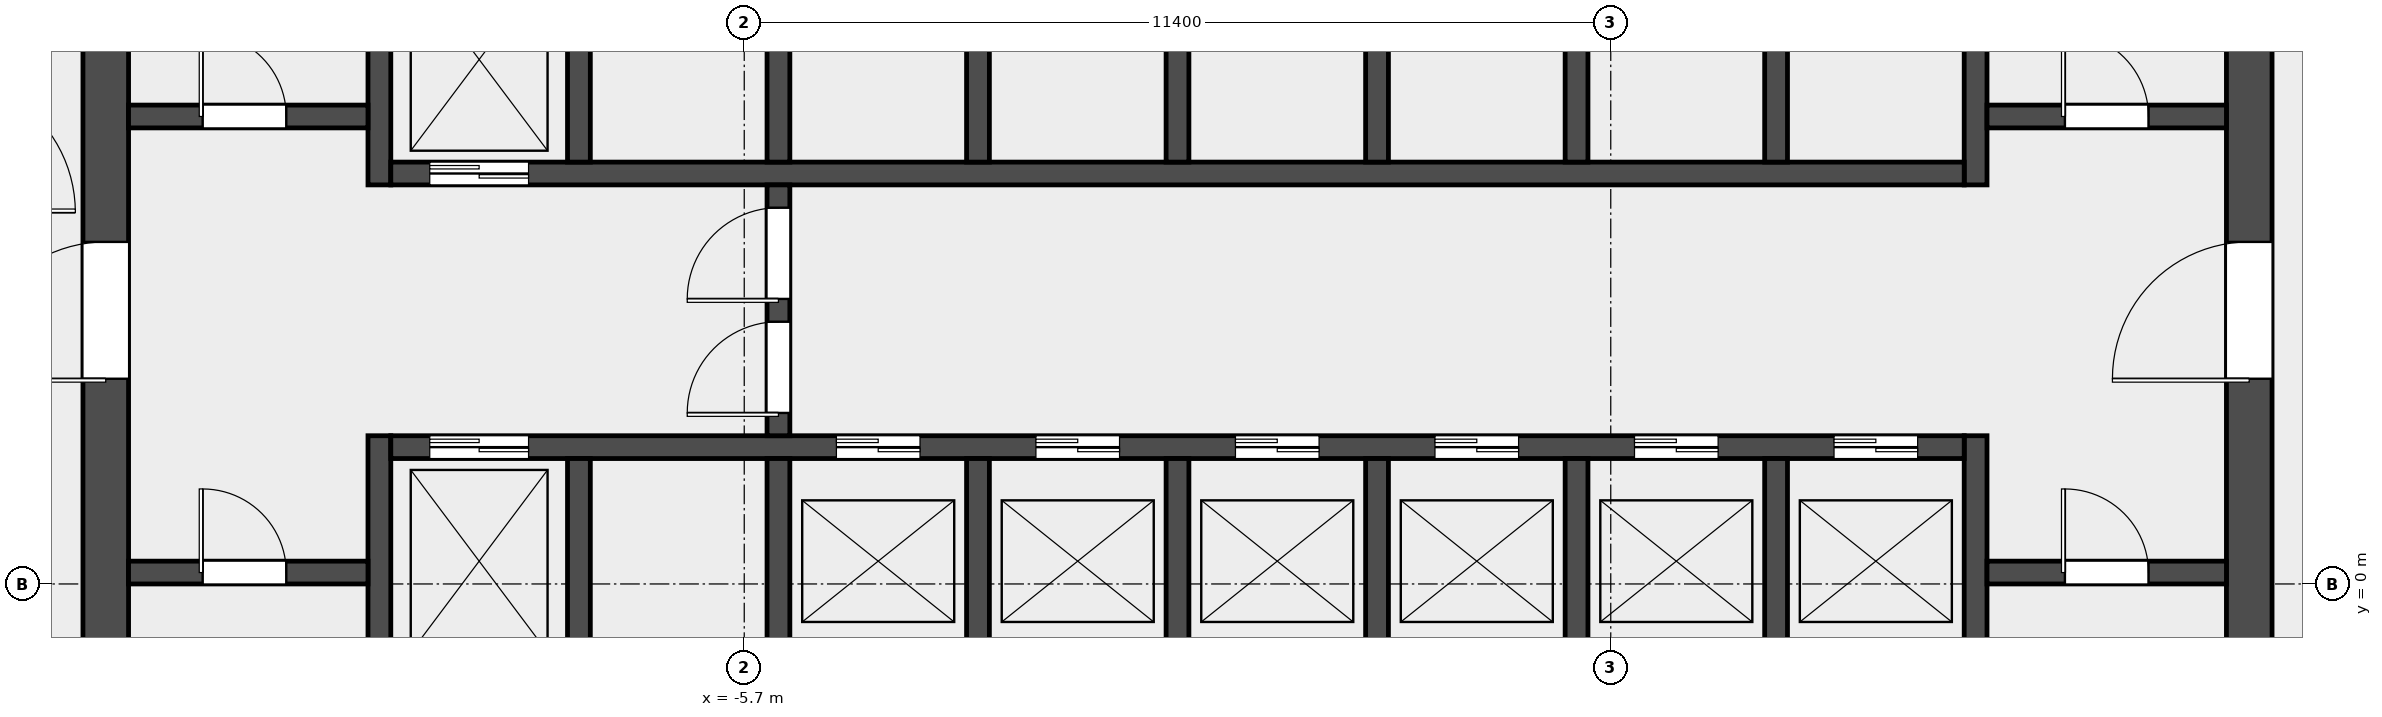
"""IFC4 building model, lengths in metres.
Left out: names, types, materials, properties, quantities, classifications, styles, units other than length and angle.
Written with IfcOpenShell. Run it as: python <this file> out.ifc"""

import sys

from ifc_helpers import new_model, si_unit, direction, frame, frame_2d, origin, place, context, subcontext, project, spatial, rectangle, extrude, element, fill, save


model = new_model("IFC4")
c1 = context("Model", 3, precision=1e-05, world=origin(), true_north=direction((0.0, 1.0)))
c2 = subcontext(c1, "Body", "Model", "MODEL_VIEW")
j1 = project(units=[si_unit("LENGTHUNIT", "METRE"), si_unit("PLANEANGLEUNIT", "RADIAN")], contexts=[c1])
p1 = place(None, origin())
s1 = spatial("IfcSite", under=j1, at=p1, CompositionType="ELEMENT")
p2 = place(p1, origin())
s2 = spatial("IfcBuilding", under=s1, at=p2, CompositionType="ELEMENT")
p3 = place(p2, frame((0.0, 0.0, 121.6)))
s3 = spatial("IfcBuildingStorey", under=s2, at=p3, CompositionType="ELEMENT", Elevation=121.6)
p4 = place(p3, frame((-14.1, -6.6, 0.0), z_axis=(0.0, 0.0, 1.0), x_axis=(0.0, 1.0, 0.0)))
e1 = element("IfcWall", 1, at=p4, inside=s3, PredefinedType="SHEAR", context=c2, shape_type="SweptSolid", body=[
    extrude(rectangle(XDim=19.5, YDim=0.6, at=frame_2d((9.75, 0.0))), origin(), (0.0, 0.0, 1.0), 4.2),
])
p5 = place(p4, frame((9.3, 0.0, 0.0)))
e2 = element("IfcOpeningElement", 2, at=p5, cuts=e1, PredefinedType="OPENING", context=c2, shape_type="SweptSolid", body=[
    extrude(rectangle(XDim=1.8, YDim=2.1, at=frame_2d((0.9, 1.05))), frame((0.0, 0.312, 0.0), z_axis=(0.0, -1.0, 0.0), x_axis=(1.0, 0.0, 0.0)), (0.0, 0.0, 1.0), 0.624),
])
p6 = place(p3, frame((14.1, -6.6, 0.0), z_axis=(0.0, 0.0, 1.0), x_axis=(0.0, 1.0, 0.0)))
e3 = element("IfcWall", 3, at=p6, inside=s3, PredefinedType="SHEAR", context=c2, shape_type="SweptSolid", body=[
    extrude(rectangle(XDim=19.5, YDim=0.6, at=frame_2d((9.75, 0.0))), origin(), (0.0, 0.0, 1.0), 4.2),
])
p7 = place(p6, frame((9.3, 0.0, 0.0)))
e4 = element("IfcOpeningElement", 4, at=p7, cuts=e3, PredefinedType="OPENING", context=c2, shape_type="SweptSolid", body=[
    extrude(rectangle(XDim=1.8, YDim=2.1, at=frame_2d((0.9, 1.05))), frame((0.0, 0.312, 0.0), z_axis=(0.0, -1.0, 0.0), x_axis=(1.0, 0.0, 0.0)), (0.0, 0.0, 1.0), 0.624),
])
p8 = place(p3, frame((-10.5, -6.6, 0.0), z_axis=(0.0, 0.0, 1.0), x_axis=(0.0, 1.0, 0.0)))
e5 = element("IfcWall", 5, at=p8, inside=s3, PredefinedType="SHEAR", context=c2, shape_type="SweptSolid", body=[
    extrude(rectangle(XDim=8.55, YDim=0.3, at=frame_2d((4.275, 0.0))), origin(), (0.0, 0.0, 1.0), 4.2),
])
p9 = place(p3, frame((-10.5, 5.25, 0.0), z_axis=(0.0, 0.0, 1.0), x_axis=(0.0, 1.0, 0.0)))
e6 = element("IfcWall", 6, at=p9, inside=s3, PredefinedType="SHEAR", context=c2, shape_type="SweptSolid", body=[
    extrude(rectangle(XDim=7.65, YDim=0.3, at=frame_2d((3.825, 0.0))), origin(), (0.0, 0.0, 1.0), 4.2),
])
p10 = place(p3, frame((10.5, -6.6, 0.0), z_axis=(0.0, 0.0, 1.0), x_axis=(0.0, 1.0, 0.0)))
e7 = element("IfcWall", 7, at=p10, inside=s3, PredefinedType="SHEAR", context=c2, shape_type="SweptSolid", body=[
    extrude(rectangle(XDim=8.55, YDim=0.3, at=frame_2d((4.275, 0.0))), origin(), (0.0, 0.0, 1.0), 4.2),
])
p11 = place(p3, frame((10.5, 5.25, 0.0), z_axis=(0.0, 0.0, 1.0), x_axis=(0.0, 1.0, 0.0)))
e8 = element("IfcWall", 8, at=p11, inside=s3, PredefinedType="SHEAR", context=c2, shape_type="SweptSolid", body=[
    extrude(rectangle(XDim=7.65, YDim=0.3, at=frame_2d((3.825, 0.0))), origin(), (0.0, 0.0, 1.0), 4.2),
])
p12 = place(p3, frame((-13.8, 0.15, 0.0), z_axis=(0.0, 0.0, 1.0), x_axis=(1.0, 0.0, 0.0)))
e9 = element("IfcWall", 9, at=p12, inside=s3, PredefinedType="SOLIDWALL", context=c2, shape_type="SweptSolid", body=[
    extrude(rectangle(XDim=3.15, YDim=0.3, at=frame_2d((1.575, 0.0))), origin(), (0.0, 0.0, 1.0), 4.2),
])
p13 = place(p12, frame((0.975, 0.0, 0.0)))
e10 = element("IfcOpeningElement", 10, at=p13, cuts=e9, PredefinedType="OPENING", context=c2, shape_type="SweptSolid", body=[
    extrude(rectangle(XDim=1.1, YDim=2.1, at=frame_2d((0.55, 1.05))), frame((0.0, 0.162, 0.0), z_axis=(0.0, -1.0, 0.0), x_axis=(1.0, 0.0, 0.0)), (0.0, 0.0, 1.0), 0.324),
])
p14 = place(p3, frame((-13.8, 6.15, 0.0), z_axis=(0.0, 0.0, 1.0), x_axis=(1.0, 0.0, 0.0)))
e11 = element("IfcWall", 11, at=p14, inside=s3, PredefinedType="SOLIDWALL", context=c2, shape_type="SweptSolid", body=[
    extrude(rectangle(XDim=3.15, YDim=0.3, at=frame_2d((1.575, 0.0))), origin(), (0.0, 0.0, 1.0), 4.2),
])
p15 = place(p14, frame((0.975, 0.0, 0.0)))
e12 = element("IfcOpeningElement", 12, at=p15, cuts=e11, PredefinedType="OPENING", context=c2, shape_type="SweptSolid", body=[
    extrude(rectangle(XDim=1.1, YDim=2.1, at=frame_2d((0.55, 1.05))), frame((0.0, 0.162, 0.0), z_axis=(0.0, -1.0, 0.0), x_axis=(1.0, 0.0, 0.0)), (0.0, 0.0, 1.0), 0.324),
])
p16 = place(p3, frame((10.65, 0.15, 0.0), z_axis=(0.0, 0.0, 1.0), x_axis=(1.0, 0.0, 0.0)))
e13 = element("IfcWall", 13, at=p16, inside=s3, PredefinedType="SOLIDWALL", context=c2, shape_type="SweptSolid", body=[
    extrude(rectangle(XDim=3.15, YDim=0.3, at=frame_2d((1.575, 0.0))), origin(), (0.0, 0.0, 1.0), 4.2),
])
p17 = place(p16, frame((1.025, 0.0, 0.0)))
e14 = element("IfcOpeningElement", 14, at=p17, cuts=e13, PredefinedType="OPENING", context=c2, shape_type="SweptSolid", body=[
    extrude(rectangle(XDim=1.1, YDim=2.1, at=frame_2d((0.55, 1.05))), frame((0.0, 0.162, 0.0), z_axis=(0.0, -1.0, 0.0), x_axis=(1.0, 0.0, 0.0)), (0.0, 0.0, 1.0), 0.324),
])
p18 = place(p3, frame((10.65, 6.15, 0.0), z_axis=(0.0, 0.0, 1.0), x_axis=(1.0, 0.0, 0.0)))
e15 = element("IfcWall", 15, at=p18, inside=s3, PredefinedType="SOLIDWALL", context=c2, shape_type="SweptSolid", body=[
    extrude(rectangle(XDim=3.15, YDim=0.3, at=frame_2d((1.575, 0.0))), origin(), (0.0, 0.0, 1.0), 4.2),
])
p19 = place(p18, frame((1.025, 0.0, 0.0)))
e16 = element("IfcOpeningElement", 16, at=p19, cuts=e15, PredefinedType="OPENING", context=c2, shape_type="SweptSolid", body=[
    extrude(rectangle(XDim=1.1, YDim=2.1, at=frame_2d((0.55, 1.05))), frame((0.0, 0.162, 0.0), z_axis=(0.0, -1.0, 0.0), x_axis=(1.0, 0.0, 0.0)), (0.0, 0.0, 1.0), 0.324),
])
p20 = place(p3, frame((-10.35, 1.8, 0.0), z_axis=(0.0, 0.0, 1.0), x_axis=(1.0, 0.0, 0.0)))
e17 = element("IfcWall", 17, at=p20, inside=s3, PredefinedType="SOLIDWALL", context=c2, shape_type="SweptSolid", body=[
    extrude(rectangle(XDim=20.7, YDim=0.3, at=frame_2d((10.35, 0.0))), origin(), (0.0, 0.0, 1.0), 4.2),
])
p21 = place(p20, frame((0.512, 0.0, 0.0)))
e18 = element("IfcOpeningElement", 18, at=p21, cuts=e17, PredefinedType="OPENING", context=c2, shape_type="SweptSolid", body=[
    extrude(rectangle(XDim=1.3, YDim=2.1, at=frame_2d((0.65, 1.05))), frame((0.0, 0.162, 0.0), z_axis=(0.0, -1.0, 0.0), x_axis=(1.0, 0.0, 0.0)), (0.0, 0.0, 1.0), 0.324),
])
p22 = place(p20, frame((5.863, 0.0, 0.0)))
e19 = element("IfcOpeningElement", 19, at=p22, cuts=e17, PredefinedType="OPENING", context=c2, shape_type="SweptSolid", body=[
    extrude(rectangle(XDim=1.1, YDim=2.1, at=frame_2d((0.55, 1.05))), frame((0.0, 0.162, 0.0), z_axis=(0.0, -1.0, 0.0), x_axis=(1.0, 0.0, 0.0)), (0.0, 0.0, 1.0), 0.324),
])
p23 = place(p20, frame((8.488, 0.0, 0.0)))
e20 = element("IfcOpeningElement", 20, at=p23, cuts=e17, PredefinedType="OPENING", context=c2, shape_type="SweptSolid", body=[
    extrude(rectangle(XDim=1.1, YDim=2.1, at=frame_2d((0.55, 1.05))), frame((0.0, 0.162, 0.0), z_axis=(0.0, -1.0, 0.0), x_axis=(1.0, 0.0, 0.0)), (0.0, 0.0, 1.0), 0.324),
])
p24 = place(p20, frame((11.113, 0.0, 0.0)))
e21 = element("IfcOpeningElement", 21, at=p24, cuts=e17, PredefinedType="OPENING", context=c2, shape_type="SweptSolid", body=[
    extrude(rectangle(XDim=1.1, YDim=2.1, at=frame_2d((0.55, 1.05))), frame((0.0, 0.162, 0.0), z_axis=(0.0, -1.0, 0.0), x_axis=(1.0, 0.0, 0.0)), (0.0, 0.0, 1.0), 0.324),
])
p25 = place(p20, frame((13.738, 0.0, 0.0)))
e22 = element("IfcOpeningElement", 22, at=p25, cuts=e17, PredefinedType="OPENING", context=c2, shape_type="SweptSolid", body=[
    extrude(rectangle(XDim=1.1, YDim=2.1, at=frame_2d((0.55, 1.05))), frame((0.0, 0.162, 0.0), z_axis=(0.0, -1.0, 0.0), x_axis=(1.0, 0.0, 0.0)), (0.0, 0.0, 1.0), 0.324),
])
p26 = place(p20, frame((16.363, 0.0, 0.0)))
e23 = element("IfcOpeningElement", 23, at=p26, cuts=e17, PredefinedType="OPENING", context=c2, shape_type="SweptSolid", body=[
    extrude(rectangle(XDim=1.1, YDim=2.1, at=frame_2d((0.55, 1.05))), frame((0.0, 0.162, 0.0), z_axis=(0.0, -1.0, 0.0), x_axis=(1.0, 0.0, 0.0)), (0.0, 0.0, 1.0), 0.324),
])
p27 = place(p20, frame((18.988, 0.0, 0.0)))
e24 = element("IfcOpeningElement", 24, at=p27, cuts=e17, PredefinedType="OPENING", context=c2, shape_type="SweptSolid", body=[
    extrude(rectangle(XDim=1.1, YDim=2.1, at=frame_2d((0.55, 1.05))), frame((0.0, 0.162, 0.0), z_axis=(0.0, -1.0, 0.0), x_axis=(1.0, 0.0, 0.0)), (0.0, 0.0, 1.0), 0.324),
])
p28 = place(p3, frame((-10.35, 5.4, 0.0), z_axis=(0.0, 0.0, 1.0), x_axis=(1.0, 0.0, 0.0)))
e25 = element("IfcWall", 25, at=p28, inside=s3, PredefinedType="SOLIDWALL", context=c2, shape_type="SweptSolid", body=[
    extrude(rectangle(XDim=20.7, YDim=0.3, at=frame_2d((10.35, 0.0))), origin(), (0.0, 0.0, 1.0), 4.2),
])
p29 = place(p28, frame((0.512, 0.0, 0.0)))
e26 = element("IfcOpeningElement", 26, at=p29, cuts=e25, PredefinedType="OPENING", context=c2, shape_type="SweptSolid", body=[
    extrude(rectangle(XDim=1.3, YDim=2.1, at=frame_2d((0.65, 1.05))), frame((0.0, 0.162, 0.0), z_axis=(0.0, -1.0, 0.0), x_axis=(1.0, 0.0, 0.0)), (0.0, 0.0, 1.0), 0.324),
])
for number, where, z_axis, x_axis in (
    (27, (-7.875, -1.05, 0.0), (0.0, 0.0, 1.0), (0.0, 1.0, 0.0)),
    (28, (-5.25, -1.05, 0.0), (0.0, 0.0, 1.0), (0.0, 1.0, 0.0)),
    (29, (-2.625, -1.05, 0.0), (0.0, 0.0, 1.0), (0.0, 1.0, 0.0)),
    (30, (0.0, -1.05, 0.0), (0.0, 0.0, 1.0), (0.0, 1.0, 0.0)),
    (31, (2.625, -1.05, 0.0), (0.0, 0.0, 1.0), (0.0, 1.0, 0.0)),
    (32, (5.25, -1.05, 0.0), (0.0, 0.0, 1.0), (0.0, 1.0, 0.0)),
    (33, (7.875, -1.05, 0.0), (0.0, 0.0, 1.0), (0.0, 1.0, 0.0)),
    (34, (-7.875, 5.55, 0.0), (0.0, 0.0, 1.0), (0.0, 1.0, 0.0)),
    (35, (-5.25, 5.55, 0.0), (0.0, 0.0, 1.0), (0.0, 1.0, 0.0)),
    (36, (-2.625, 5.55, 0.0), (0.0, 0.0, 1.0), (0.0, 1.0, 0.0)),
    (37, (0.0, 5.55, 0.0), (0.0, 0.0, 1.0), (0.0, 1.0, 0.0)),
    (38, (2.625, 5.55, 0.0), (0.0, 0.0, 1.0), (0.0, 1.0, 0.0)),
    (39, (5.25, 5.55, 0.0), (0.0, 0.0, 1.0), (0.0, 1.0, 0.0)),
    (40, (7.875, 5.55, 0.0), (0.0, 0.0, 1.0), (0.0, 1.0, 0.0)),
):
    element("IfcWall", number, at=place(p3, frame(where, z_axis=z_axis, x_axis=x_axis)), inside=s3, PredefinedType="SOLIDWALL", context=c2, shape_type="SweptSolid", body=[
        extrude(rectangle(XDim=2.7, YDim=0.3, at=frame_2d((1.35, 0.0))), origin(), (0.0, 0.0, 1.0), 4.2),
    ])
p30 = place(p3, frame((-5.25, 1.95, 0.0), z_axis=(0.0, 0.0, 1.0), x_axis=(0.0, 1.0, 0.0)))
e41 = element("IfcWall", 41, at=p30, inside=s3, PredefinedType="SOLIDWALL", context=c2, shape_type="SweptSolid", body=[
    extrude(rectangle(XDim=3.3, YDim=0.3, at=frame_2d((1.65, 0.0))), origin(), (0.0, 0.0, 1.0), 4.2),
])
p31 = place(p30, frame((0.3, 0.0, 0.0)))
e42 = element("IfcOpeningElement", 42, at=p31, cuts=e41, PredefinedType="OPENING", context=c2, shape_type="SweptSolid", body=[
    extrude(rectangle(XDim=1.2, YDim=2.1, at=frame_2d((0.6, 1.05))), frame((0.0, 0.162, 0.0), z_axis=(0.0, -1.0, 0.0), x_axis=(1.0, 0.0, 0.0)), (0.0, 0.0, 1.0), 0.324),
])
p32 = place(p30, frame((1.8, 0.0, 0.0)))
e43 = element("IfcOpeningElement", 43, at=p32, cuts=e41, PredefinedType="OPENING", context=c2, shape_type="SweptSolid", body=[
    extrude(rectangle(XDim=1.2, YDim=2.1, at=frame_2d((0.6, 1.05))), frame((0.0, 0.162, 0.0), z_axis=(0.0, -1.0, 0.0), x_axis=(1.0, 0.0, 0.0)), (0.0, 0.0, 1.0), 0.324),
])
p33 = place(p13, origin())
e44 = element("IfcDoor", 44, at=p33, inside=s3, OperationType="SINGLE_SWING_LEFT", PredefinedType="DOOR", context=c2, shape_type="SweptSolid", body=[
    extrude(rectangle(XDim=1.1, YDim=2.1, at=frame_2d((0.55, 1.05))), frame((0.0, 0.025, 0.0), z_axis=(0.0, -1.0, 0.0), x_axis=(1.0, 0.0, 0.0)), (0.0, 0.0, 1.0), 0.05),
])
fill(e10, e44)
p34 = place(p15, origin())
e45 = element("IfcDoor", 45, at=p34, inside=s3, OperationType="SINGLE_SWING_LEFT", PredefinedType="DOOR", context=c2, shape_type="SweptSolid", body=[
    extrude(rectangle(XDim=1.1, YDim=2.1, at=frame_2d((0.55, 1.05))), frame((0.0, 0.025, 0.0), z_axis=(0.0, -1.0, 0.0), x_axis=(1.0, 0.0, 0.0)), (0.0, 0.0, 1.0), 0.05),
])
fill(e12, e45)
p35 = place(p17, origin())
e46 = element("IfcDoor", 46, at=p35, inside=s3, OperationType="SINGLE_SWING_RIGHT", PredefinedType="DOOR", context=c2, shape_type="SweptSolid", body=[
    extrude(rectangle(XDim=1.1, YDim=2.1, at=frame_2d((0.55, 1.05))), frame((0.0, 0.025, 0.0), z_axis=(0.0, -1.0, 0.0), x_axis=(1.0, 0.0, 0.0)), (0.0, 0.0, 1.0), 0.05),
])
fill(e14, e46)
p36 = place(p19, origin())
e47 = element("IfcDoor", 47, at=p36, inside=s3, OperationType="SINGLE_SWING_RIGHT", PredefinedType="DOOR", context=c2, shape_type="SweptSolid", body=[
    extrude(rectangle(XDim=1.1, YDim=2.1, at=frame_2d((0.55, 1.05))), frame((0.0, 0.025, 0.0), z_axis=(0.0, -1.0, 0.0), x_axis=(1.0, 0.0, 0.0)), (0.0, 0.0, 1.0), 0.05),
])
fill(e16, e47)
p37 = place(p5, origin())
e48 = element("IfcDoor", 48, at=p37, inside=s3, OperationType="DOUBLE_DOOR_SINGLE_SWING", PredefinedType="DOOR", context=c2, shape_type="SweptSolid", body=[
    extrude(rectangle(XDim=1.8, YDim=2.1, at=frame_2d((0.9, 1.05))), frame((0.0, 0.025, 0.0), z_axis=(0.0, -1.0, 0.0), x_axis=(1.0, 0.0, 0.0)), (0.0, 0.0, 1.0), 0.05),
])
fill(e2, e48)
p38 = place(p7, origin())
e49 = element("IfcDoor", 49, at=p38, inside=s3, OperationType="DOUBLE_DOOR_SINGLE_SWING", PredefinedType="DOOR", context=c2, shape_type="SweptSolid", body=[
    extrude(rectangle(XDim=1.8, YDim=2.1, at=frame_2d((0.9, 1.05))), frame((0.0, 0.025, 0.0), z_axis=(0.0, -1.0, 0.0), x_axis=(1.0, 0.0, 0.0)), (0.0, 0.0, 1.0), 0.05),
])
fill(e4, e49)
p39 = place(p31, origin())
e50 = element("IfcDoor", 50, at=p39, inside=s3, OperationType="SINGLE_SWING_LEFT", PredefinedType="DOOR", context=c2, shape_type="SweptSolid", body=[
    extrude(rectangle(XDim=1.2, YDim=2.1, at=frame_2d((0.6, 1.05))), frame((0.0, 0.025, 0.0), z_axis=(0.0, -1.0, 0.0), x_axis=(1.0, 0.0, 0.0)), (0.0, 0.0, 1.0), 0.05),
])
fill(e42, e50)
p40 = place(p32, origin())
e51 = element("IfcDoor", 51, at=p40, inside=s3, OperationType="SINGLE_SWING_RIGHT", PredefinedType="DOOR", context=c2, shape_type="SweptSolid", body=[
    extrude(rectangle(XDim=1.2, YDim=2.1, at=frame_2d((0.6, 1.05))), frame((0.0, 0.025, 0.0), z_axis=(0.0, -1.0, 0.0), x_axis=(1.0, 0.0, 0.0)), (0.0, 0.0, 1.0), 0.05),
])
fill(e43, e51)
p41 = place(p21, origin())
e52 = element("IfcDoor", 52, at=p41, inside=s3, OperationType="DOUBLE_DOOR_SLIDING", PredefinedType="DOOR", context=c2, shape_type="SweptSolid", body=[
    extrude(rectangle(XDim=1.3, YDim=2.1, at=frame_2d((0.65, 1.05))), frame((0.0, 0.025, 0.0), z_axis=(0.0, -1.0, 0.0), x_axis=(1.0, 0.0, 0.0)), (0.0, 0.0, 1.0), 0.05),
])
fill(e18, e52)
p42 = place(p22, origin())
e53 = element("IfcDoor", 53, at=p42, inside=s3, OperationType="DOUBLE_DOOR_SLIDING", PredefinedType="DOOR", context=c2, shape_type="SweptSolid", body=[
    extrude(rectangle(XDim=1.1, YDim=2.1, at=frame_2d((0.55, 1.05))), frame((0.0, 0.025, 0.0), z_axis=(0.0, -1.0, 0.0), x_axis=(1.0, 0.0, 0.0)), (0.0, 0.0, 1.0), 0.05),
])
fill(e19, e53)
p43 = place(p23, origin())
e54 = element("IfcDoor", 54, at=p43, inside=s3, OperationType="DOUBLE_DOOR_SLIDING", PredefinedType="DOOR", context=c2, shape_type="SweptSolid", body=[
    extrude(rectangle(XDim=1.1, YDim=2.1, at=frame_2d((0.55, 1.05))), frame((0.0, 0.025, 0.0), z_axis=(0.0, -1.0, 0.0), x_axis=(1.0, 0.0, 0.0)), (0.0, 0.0, 1.0), 0.05),
])
fill(e20, e54)
p44 = place(p24, origin())
e55 = element("IfcDoor", 55, at=p44, inside=s3, OperationType="DOUBLE_DOOR_SLIDING", PredefinedType="DOOR", context=c2, shape_type="SweptSolid", body=[
    extrude(rectangle(XDim=1.1, YDim=2.1, at=frame_2d((0.55, 1.05))), frame((0.0, 0.025, 0.0), z_axis=(0.0, -1.0, 0.0), x_axis=(1.0, 0.0, 0.0)), (0.0, 0.0, 1.0), 0.05),
])
fill(e21, e55)
p45 = place(p25, origin())
e56 = element("IfcDoor", 56, at=p45, inside=s3, OperationType="DOUBLE_DOOR_SLIDING", PredefinedType="DOOR", context=c2, shape_type="SweptSolid", body=[
    extrude(rectangle(XDim=1.1, YDim=2.1, at=frame_2d((0.55, 1.05))), frame((0.0, 0.025, 0.0), z_axis=(0.0, -1.0, 0.0), x_axis=(1.0, 0.0, 0.0)), (0.0, 0.0, 1.0), 0.05),
])
fill(e22, e56)
p46 = place(p26, origin())
e57 = element("IfcDoor", 57, at=p46, inside=s3, OperationType="DOUBLE_DOOR_SLIDING", PredefinedType="DOOR", context=c2, shape_type="SweptSolid", body=[
    extrude(rectangle(XDim=1.1, YDim=2.1, at=frame_2d((0.55, 1.05))), frame((0.0, 0.025, 0.0), z_axis=(0.0, -1.0, 0.0), x_axis=(1.0, 0.0, 0.0)), (0.0, 0.0, 1.0), 0.05),
])
fill(e23, e57)
p47 = place(p27, origin())
e58 = element("IfcDoor", 58, at=p47, inside=s3, OperationType="DOUBLE_DOOR_SLIDING", PredefinedType="DOOR", context=c2, shape_type="SweptSolid", body=[
    extrude(rectangle(XDim=1.1, YDim=2.1, at=frame_2d((0.55, 1.05))), frame((0.0, 0.025, 0.0), z_axis=(0.0, -1.0, 0.0), x_axis=(1.0, 0.0, 0.0)), (0.0, 0.0, 1.0), 0.05),
])
fill(e24, e58)
p48 = place(p29, origin())
e59 = element("IfcDoor", 59, at=p48, inside=s3, OperationType="DOUBLE_DOOR_SLIDING", PredefinedType="DOOR", context=c2, shape_type="SweptSolid", body=[
    extrude(rectangle(XDim=1.3, YDim=2.1, at=frame_2d((0.65, 1.05))), frame((0.0, 0.025, 0.0), z_axis=(0.0, -1.0, 0.0), x_axis=(1.0, 0.0, 0.0)), (0.0, 0.0, 1.0), 0.05),
])
fill(e26, e59)
save(model, sys.argv[1])
